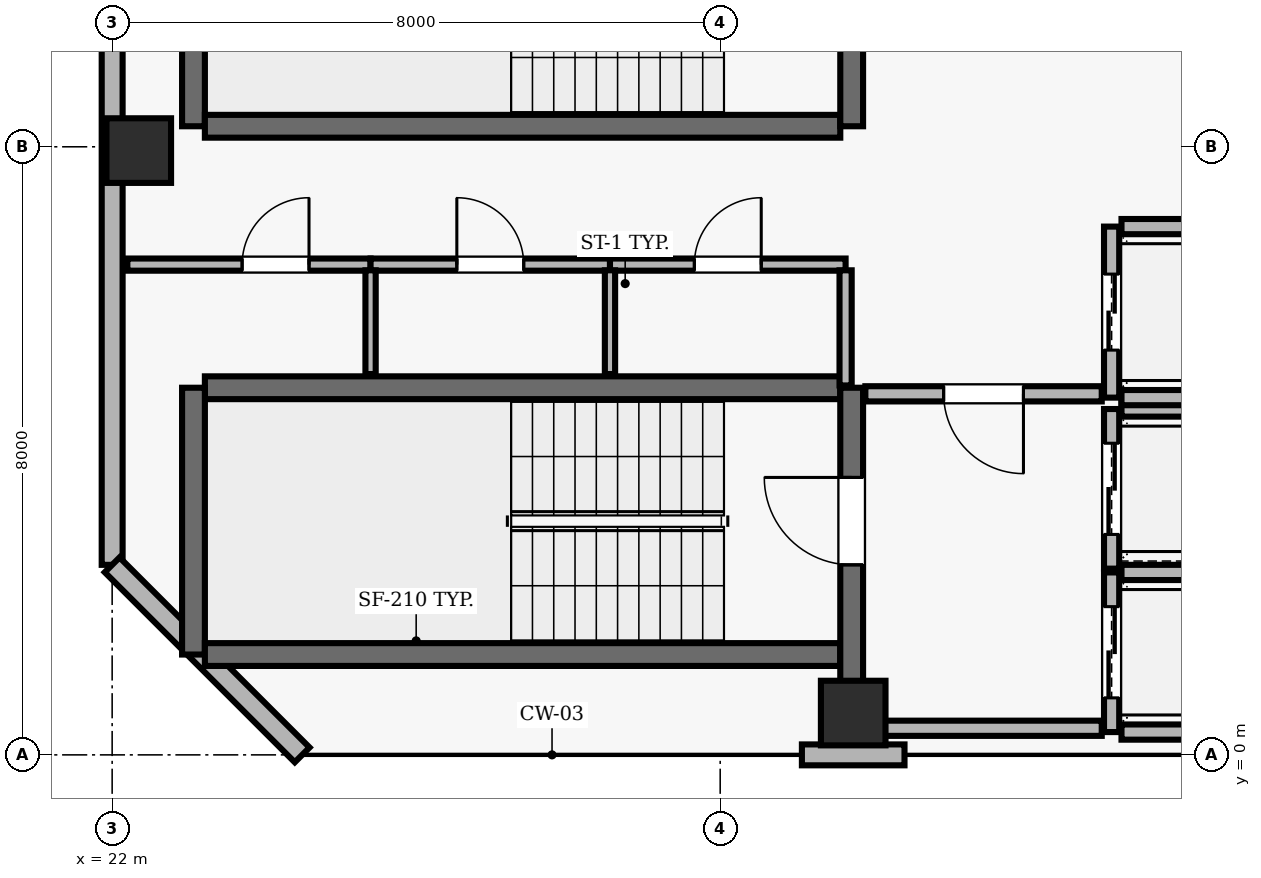
"""IFC4 building model, lengths in metres.
Left out: names, types, materials, properties, quantities, classifications, styles, units other than length and angle.
Written with IfcOpenShell. Run it as: python <this file> out.ifc"""

import sys

from ifc_helpers import new_model, si_unit, direction, frame, frame_2d, origin, origin_2d, place, context, subcontext, project, spatial, rectangle, extrude, element, fill, save


model = new_model("IFC4")
c1 = context("Model", 3, precision=1e-05, world=origin(), true_north=direction((0.0, 1.0)))
c2 = subcontext(c1, "Body", "Model", "MODEL_VIEW")
j1 = project(units=[si_unit("LENGTHUNIT", "METRE"), si_unit("PLANEANGLEUNIT", "RADIAN")], contexts=[c1])
p1 = place(None, origin())
s1 = spatial("IfcSite", under=j1, at=p1, CompositionType="ELEMENT")
p2 = place(p1, origin())
s2 = spatial("IfcBuilding", under=s1, at=p2, CompositionType="ELEMENT")
p3 = place(p2, frame((0.0, 0.0, 279.4)))
s3 = spatial("IfcBuildingStorey", under=s2, at=p3, CompositionType="ELEMENT", Elevation=279.4)
for number, where, z_axis, x_axis in (
    (1, (31.75, 0.55, 0.0), (0.0, 0.0, 1.0), (1.0, 0.0, 0.0)),
    (2, (22.35, 7.95, 0.0), (0.0, 0.0, 1.0), (1.0, 0.0, 0.0)),
):
    element("IfcColumn", number, at=place(p3, frame(where, z_axis=z_axis, x_axis=x_axis)), inside=s3, PredefinedType="COLUMN", context=c2, shape_type="SweptSolid", body=[
        extrude(rectangle(XDim=0.85, YDim=0.85, at=origin_2d()), origin(), (0.0, 0.0, 1.0), 3.9),
    ])
p4 = place(p3, frame((31.075, 0.0, 0.0), z_axis=(0.0, 0.0, 1.0), x_axis=(1.0, 0.0, 0.0)))
e3 = element("IfcWall", 3, at=p4, inside=s3, PredefinedType="SOLIDWALL", context=c2, shape_type="SweptSolid", body=[
    extrude(rectangle(XDim=1.35, YDim=0.275, at=frame_2d((0.675, 0.0))), origin(), (0.0, 0.0, 1.0), 3.69),
])
p5 = place(p3, frame((22.0, 35.3, 0.0), z_axis=(0.0, 0.0, 1.0), x_axis=(0.0, -1.0, 0.0)))
e4 = element("IfcWall", 4, at=p5, inside=s3, PredefinedType="SOLIDWALL", context=c2, shape_type="SweptSolid", body=[
    extrude(rectangle(XDim=32.8, YDim=0.275, at=frame_2d((16.4, 0.0))), origin(), (0.0, 0.0, 1.0), 3.69),
])
p6 = place(p5, frame((7.3, 0.0, 0.0)))
e5 = element("IfcOpeningElement", 5, at=p6, cuts=e4, PredefinedType="OPENING", context=c2, shape_type="SweptSolid", body=[
    extrude(rectangle(XDim=1.0, YDim=2.2, at=frame_2d((0.5, 1.1))), frame((0.0, 0.147, 0.0), z_axis=(0.0, -1.0, 0.0), x_axis=(1.0, 0.0, 0.0)), (0.0, 0.0, 1.0), 0.295),
])
p7 = place(p5, frame((12.717, 0.0, 0.9)))
e6 = element("IfcOpeningElement", 6, at=p7, cuts=e4, PredefinedType="OPENING", context=c2, shape_type="SweptSolid", body=[
    extrude(rectangle(XDim=2.8, YDim=1.8, at=frame_2d((1.4, 0.9))), frame((0.0, 0.147, 0.0), z_axis=(0.0, -1.0, 0.0), x_axis=(1.0, 0.0, 0.0)), (0.0, 0.0, 1.0), 0.295),
])
p8 = place(p5, frame((23.2, 0.0, 0.9)))
e7 = element("IfcOpeningElement", 7, at=p8, cuts=e4, PredefinedType="OPENING", context=c2, shape_type="SweptSolid", body=[
    extrude(rectangle(XDim=2.8, YDim=1.8, at=frame_2d((1.4, 0.9))), frame((0.0, 0.147, 0.0), z_axis=(0.0, -1.0, 0.0), x_axis=(1.0, 0.0, 0.0)), (0.0, 0.0, 1.0), 0.295),
])
p9 = place(p3, frame((22.0, 2.5, 0.0), z_axis=(0.0, 0.0, 1.0), x_axis=(0.707106781187, -0.707106781187, 0.0)))
e8 = element("IfcWall", 8, at=p9, inside=s3, PredefinedType="SOLIDWALL", context=c2, shape_type="SweptSolid", body=[
    extrude(rectangle(XDim=3.536, YDim=0.275, at=frame_2d((1.768, 0.0))), origin(), (0.0, 0.0, 1.0), 3.69),
])
p10 = place(p3, frame((31.58, 4.83, 0.0), z_axis=(0.0, 0.0, 1.0), x_axis=(-1.0, 0.0, 0.0)))
e9 = element("IfcWall", 9, at=p10, inside=s3, PredefinedType="SHEAR", context=c2, shape_type="SweptSolid", body=[
    extrude(rectangle(XDim=8.36, YDim=0.3, at=frame_2d((4.18, 0.0))), origin(), (0.0, 0.0, 1.0), 3.69),
])
p11 = place(p3, frame((23.07, 4.83, 0.0), z_axis=(0.0, 0.0, 1.0), x_axis=(0.0, -1.0, 0.0)))
e10 = element("IfcWall", 10, at=p11, inside=s3, PredefinedType="SHEAR", context=c2, shape_type="SweptSolid", body=[
    extrude(rectangle(XDim=3.51, YDim=0.3, at=frame_2d((1.755, 0.0))), origin(), (0.0, 0.0, 1.0), 3.69),
])
p12 = place(p3, frame((23.22, 1.32, 0.0), z_axis=(0.0, 0.0, 1.0), x_axis=(1.0, 0.0, 0.0)))
e11 = element("IfcWall", 11, at=p12, inside=s3, PredefinedType="SHEAR", context=c2, shape_type="SweptSolid", body=[
    extrude(rectangle(XDim=8.36, YDim=0.3, at=frame_2d((4.18, 0.0))), origin(), (0.0, 0.0, 1.0), 3.69),
])
p13 = place(p3, frame((31.73, 0.96, 0.0), z_axis=(0.0, 0.0, 1.0), x_axis=(0.0, 1.0, 0.0)))
e12 = element("IfcWall", 12, at=p13, inside=s3, PredefinedType="SHEAR", context=c2, shape_type="SweptSolid", body=[
    extrude(rectangle(XDim=3.87, YDim=0.3, at=frame_2d((1.935, 0.0))), origin(), (0.0, 0.0, 1.0), 3.69),
])
p14 = place(p13, frame((1.54, 0.0, 0.0)))
e13 = element("IfcOpeningElement", 13, at=p14, cuts=e12, PredefinedType="OPENING", context=c2, shape_type="SweptSolid", body=[
    extrude(rectangle(XDim=1.15, YDim=2.15, at=frame_2d((0.575, 1.075))), frame((0.0, 0.16, 0.0), z_axis=(0.0, -1.0, 0.0), x_axis=(1.0, 0.0, 0.0)), (0.0, 0.0, 1.0), 0.32),
])
p15 = place(p3, frame((23.07, 11.78, 0.0), z_axis=(0.0, 0.0, 1.0), x_axis=(0.0, -1.0, 0.0)))
e14 = element("IfcWall", 14, at=p15, inside=s3, PredefinedType="SHEAR", context=c2, shape_type="SweptSolid", body=[
    extrude(rectangle(XDim=3.51, YDim=0.3, at=frame_2d((1.755, 0.0))), origin(), (0.0, 0.0, 1.0), 3.69),
])
p16 = place(p3, frame((23.22, 8.27, 0.0), z_axis=(0.0, 0.0, 1.0), x_axis=(1.0, 0.0, 0.0)))
e15 = element("IfcWall", 15, at=p16, inside=s3, PredefinedType="SHEAR", context=c2, shape_type="SweptSolid", body=[
    extrude(rectangle(XDim=8.36, YDim=0.3, at=frame_2d((4.18, 0.0))), origin(), (0.0, 0.0, 1.0), 3.69),
])
p17 = place(p3, frame((31.73, 8.27, 0.0), z_axis=(0.0, 0.0, 1.0), x_axis=(0.0, 1.0, 0.0)))
e16 = element("IfcWall", 16, at=p17, inside=s3, PredefinedType="SHEAR", context=c2, shape_type="SweptSolid", body=[
    extrude(rectangle(XDim=3.51, YDim=0.3, at=frame_2d((1.755, 0.0))), origin(), (0.0, 0.0, 1.0), 3.69),
])
p18 = place(p17, frame((1.18, 0.0, 0.0)))
e17 = element("IfcOpeningElement", 17, at=p18, cuts=e16, PredefinedType="OPENING", context=c2, shape_type="SweptSolid", body=[
    extrude(rectangle(XDim=1.15, YDim=2.15, at=frame_2d((0.575, 1.075))), frame((0.0, 0.16, 0.0), z_axis=(0.0, -1.0, 0.0), x_axis=(1.0, 0.0, 0.0)), (0.0, 0.0, 1.0), 0.32),
])
p19 = place(p3, frame((35.15, 2.4, 0.0), z_axis=(0.0, 0.0, 1.0), x_axis=(0.0, -1.0, 0.0)))
e18 = element("IfcWall", 18, at=p19, inside=s3, PredefinedType="SOLIDWALL", context=c2, shape_type="SweptSolid", body=[
    extrude(rectangle(XDim=2.1, YDim=0.2, at=frame_2d((1.05, 0.0))), origin(), (0.0, 0.0, 1.0), 3.69),
])
p20 = place(p19, frame((0.45, 0.0, 0.0)))
e19 = element("IfcOpeningElement", 19, at=p20, cuts=e18, PredefinedType="OPENING", context=c2, shape_type="SweptSolid", body=[
    extrude(rectangle(XDim=1.2, YDim=2.15, at=frame_2d((0.6, 1.075))), frame((0.0, 0.11, 0.0), z_axis=(0.0, -1.0, 0.0), x_axis=(1.0, 0.0, 0.0)), (0.0, 0.0, 1.0), 0.22),
])
for number, where, z_axis, x_axis in (
    (20, (35.28, 0.3, 0.0), (0.0, 0.0, 1.0), (1.0, 0.0, 0.0)),
    (21, (37.42, 2.4, 0.0), (0.0, 0.0, 1.0), (-1.0, 0.0, 0.0)),
):
    element("IfcWall", number, at=place(p3, frame(where, z_axis=z_axis, x_axis=x_axis)), inside=s3, PredefinedType="SOLIDWALL", context=c2, shape_type="SweptSolid", body=[
        extrude(rectangle(XDim=2.14, YDim=0.2, at=frame_2d((1.07, 0.0))), origin(), (0.0, 0.0, 1.0), 3.69),
    ])
p21 = place(p3, frame((35.15, 4.55, 0.0), z_axis=(0.0, 0.0, 1.0), x_axis=(0.0, -1.0, 0.0)))
e22 = element("IfcWall", 22, at=p21, inside=s3, PredefinedType="SOLIDWALL", context=c2, shape_type="SweptSolid", body=[
    extrude(rectangle(XDim=2.1, YDim=0.2, at=frame_2d((1.05, 0.0))), origin(), (0.0, 0.0, 1.0), 3.69),
])
p22 = place(p21, frame((0.45, 0.0, 0.0)))
e23 = element("IfcOpeningElement", 23, at=p22, cuts=e22, PredefinedType="OPENING", context=c2, shape_type="SweptSolid", body=[
    extrude(rectangle(XDim=1.2, YDim=2.15, at=frame_2d((0.6, 1.075))), frame((0.0, 0.11, 0.0), z_axis=(0.0, -1.0, 0.0), x_axis=(1.0, 0.0, 0.0)), (0.0, 0.0, 1.0), 0.22),
])
p23 = place(p3, frame((37.42, 4.55, 0.0), z_axis=(0.0, 0.0, 1.0), x_axis=(-1.0, 0.0, 0.0)))
e24 = element("IfcWall", 24, at=p23, inside=s3, PredefinedType="SOLIDWALL", context=c2, shape_type="SweptSolid", body=[
    extrude(rectangle(XDim=2.14, YDim=0.2, at=frame_2d((1.07, 0.0))), origin(), (0.0, 0.0, 1.0), 3.69),
])
p24 = place(p3, frame((35.15, 6.95, 0.0), z_axis=(0.0, 0.0, 1.0), x_axis=(0.0, -1.0, 0.0)))
e25 = element("IfcWall", 25, at=p24, inside=s3, PredefinedType="SOLIDWALL", context=c2, shape_type="SweptSolid", body=[
    extrude(rectangle(XDim=2.25, YDim=0.2, at=frame_2d((1.125, 0.0))), origin(), (0.0, 0.0, 1.0), 3.69),
])
p25 = place(p24, frame((0.625, 0.0, 0.0)))
e26 = element("IfcOpeningElement", 26, at=p25, cuts=e25, PredefinedType="OPENING", context=c2, shape_type="SweptSolid", body=[
    extrude(rectangle(XDim=1.0, YDim=2.1, at=frame_2d((0.5, 1.05))), frame((0.0, 0.11, 0.0), z_axis=(0.0, -1.0, 0.0), x_axis=(1.0, 0.0, 0.0)), (0.0, 0.0, 1.0), 0.22),
])
for number, where, z_axis, x_axis in (
    (27, (35.28, 4.7, 0.0), (0.0, 0.0, 1.0), (1.0, 0.0, 0.0)),
    (28, (37.42, 6.95, 0.0), (0.0, 0.0, 1.0), (-1.0, 0.0, 0.0)),
):
    element("IfcWall", number, at=place(p3, frame(where, z_axis=z_axis, x_axis=x_axis)), inside=s3, PredefinedType="SOLIDWALL", context=c2, shape_type="SweptSolid", body=[
        extrude(rectangle(XDim=2.14, YDim=0.2, at=frame_2d((1.07, 0.0))), origin(), (0.0, 0.0, 1.0), 3.69),
    ])
p26 = place(p3, frame((22.2, 6.45, 0.0), z_axis=(0.0, 0.0, 1.0), x_axis=(1.0, 0.0, 0.0)))
e29 = element("IfcWall", 29, at=p26, inside=s3, PredefinedType="PARTITIONING", context=c2, shape_type="SweptSolid", body=[
    extrude(rectangle(XDim=3.2, YDim=0.16, at=frame_2d((1.6, 0.0))), origin(), (0.0, 0.0, 1.0), 3.69),
])
p27 = place(p26, frame((1.51, 0.0, 0.0)))
e30 = element("IfcOpeningElement", 30, at=p27, cuts=e29, PredefinedType="OPENING", context=c2, shape_type="SweptSolid", body=[
    extrude(rectangle(XDim=0.88, YDim=2.1, at=frame_2d((0.44, 1.05))), frame((0.0, 0.09, 0.0), z_axis=(0.0, -1.0, 0.0), x_axis=(1.0, 0.0, 0.0)), (0.0, 0.0, 1.0), 0.18),
])
p28 = place(p3, frame((25.4, 6.45, 0.0), z_axis=(0.0, 0.0, 1.0), x_axis=(1.0, 0.0, 0.0)))
e31 = element("IfcWall", 31, at=p28, inside=s3, PredefinedType="PARTITIONING", context=c2, shape_type="SweptSolid", body=[
    extrude(rectangle(XDim=3.15, YDim=0.16, at=frame_2d((1.575, 0.0))), origin(), (0.0, 0.0, 1.0), 3.69),
])
p29 = place(p28, frame((1.135, 0.0, 0.0)))
e32 = element("IfcOpeningElement", 32, at=p29, cuts=e31, PredefinedType="OPENING", context=c2, shape_type="SweptSolid", body=[
    extrude(rectangle(XDim=0.88, YDim=2.1, at=frame_2d((0.44, 1.05))), frame((0.0, 0.09, 0.0), z_axis=(0.0, -1.0, 0.0), x_axis=(1.0, 0.0, 0.0)), (0.0, 0.0, 1.0), 0.18),
])
p30 = place(p3, frame((28.55, 6.45, 0.0), z_axis=(0.0, 0.0, 1.0), x_axis=(1.0, 0.0, 0.0)))
e33 = element("IfcWall", 33, at=p30, inside=s3, PredefinedType="PARTITIONING", context=c2, shape_type="SweptSolid", body=[
    extrude(rectangle(XDim=3.1, YDim=0.16, at=frame_2d((1.55, 0.0))), origin(), (0.0, 0.0, 1.0), 3.69),
])
p31 = place(p30, frame((1.11, 0.0, 0.0)))
e34 = element("IfcOpeningElement", 34, at=p31, cuts=e33, PredefinedType="OPENING", context=c2, shape_type="SweptSolid", body=[
    extrude(rectangle(XDim=0.88, YDim=2.1, at=frame_2d((0.44, 1.05))), frame((0.0, 0.09, 0.0), z_axis=(0.0, -1.0, 0.0), x_axis=(1.0, 0.0, 0.0)), (0.0, 0.0, 1.0), 0.18),
])
p32 = place(p3, frame((31.65, 0.35, 0.0), z_axis=(0.0, 0.0, 1.0), x_axis=(1.0, 0.0, 0.0)))
e35 = element("IfcWall", 35, at=p32, inside=s3, PredefinedType="SOLIDWALL", context=c2, shape_type="SweptSolid", body=[
    extrude(rectangle(XDim=3.37, YDim=0.2, at=frame_2d((1.685, 0.0))), origin(), (0.0, 0.0, 1.0), 3.69),
])
p33 = place(p3, frame((35.02, 4.75, 0.0), z_axis=(0.0, 0.0, 1.0), x_axis=(-1.0, 0.0, 0.0)))
e36 = element("IfcWall", 36, at=p33, inside=s3, PredefinedType="SOLIDWALL", context=c2, shape_type="SweptSolid", body=[
    extrude(rectangle(XDim=3.11, YDim=0.2, at=frame_2d((1.555, 0.0))), origin(), (0.0, 0.0, 1.0), 3.69),
])
p34 = place(p33, frame((1.03, 0.0, 0.0)))
e37 = element("IfcOpeningElement", 37, at=p34, cuts=e36, PredefinedType="OPENING", context=c2, shape_type="SweptSolid", body=[
    extrude(rectangle(XDim=1.05, YDim=2.15, at=frame_2d((0.525, 1.075))), frame((0.0, 0.11, 0.0), z_axis=(0.0, -1.0, 0.0), x_axis=(1.0, 0.0, 0.0)), (0.0, 0.0, 1.0), 0.22),
])
for number, where, z_axis, x_axis in (
    (38, (25.4, 5.01, 0.0), (0.0, 0.0, 1.0), (0.0, 1.0, 0.0)),
    (39, (28.55, 5.01, 0.0), (0.0, 0.0, 1.0), (0.0, 1.0, 0.0)),
):
    element("IfcWall", number, at=place(p3, frame(where, z_axis=z_axis, x_axis=x_axis)), inside=s3, PredefinedType="PARTITIONING", context=c2, shape_type="SweptSolid", body=[
        extrude(rectangle(XDim=1.365, YDim=0.135, at=frame_2d((0.683, 0.0))), origin(), (0.0, 0.0, 1.0), 3.69),
    ])
p35 = place(p3, frame((31.65, 4.86, 0.0), z_axis=(0.0, 0.0, 1.0), x_axis=(0.0, 1.0, 0.0)))
e40 = element("IfcWall", 40, at=p35, inside=s3, PredefinedType="PARTITIONING", context=c2, shape_type="SweptSolid", body=[
    extrude(rectangle(XDim=1.515, YDim=0.16, at=frame_2d((0.757, 0.0))), origin(), (0.0, 0.0, 1.0), 3.69),
])
p36 = place(p14, origin())
e41 = element("IfcDoor", 41, at=p36, inside=s3, OperationType="SINGLE_SWING_RIGHT", PredefinedType="DOOR", context=c2, shape_type="SweptSolid", body=[
    extrude(rectangle(XDim=1.15, YDim=2.15, at=frame_2d((0.575, 1.075))), frame((0.0, 0.025, 0.0), z_axis=(0.0, -1.0, 0.0), x_axis=(1.0, 0.0, 0.0)), (0.0, 0.0, 1.0), 0.05),
])
fill(e13, e41)
p37 = place(p20, origin())
e42 = element("IfcDoor", 42, at=p37, inside=s3, OperationType="DOUBLE_DOOR_SLIDING", PredefinedType="DOOR", context=c2, shape_type="SweptSolid", body=[
    extrude(rectangle(XDim=1.2, YDim=2.15, at=frame_2d((0.6, 1.075))), frame((0.0, 0.025, 0.0), z_axis=(0.0, -1.0, 0.0), x_axis=(1.0, 0.0, 0.0)), (0.0, 0.0, 1.0), 0.05),
])
fill(e19, e42)
p38 = place(p22, origin())
e43 = element("IfcDoor", 43, at=p38, inside=s3, OperationType="DOUBLE_DOOR_SLIDING", PredefinedType="DOOR", context=c2, shape_type="SweptSolid", body=[
    extrude(rectangle(XDim=1.2, YDim=2.15, at=frame_2d((0.6, 1.075))), frame((0.0, 0.025, 0.0), z_axis=(0.0, -1.0, 0.0), x_axis=(1.0, 0.0, 0.0)), (0.0, 0.0, 1.0), 0.05),
])
fill(e23, e43)
p39 = place(p25, origin())
e44 = element("IfcDoor", 44, at=p39, inside=s3, OperationType="DOUBLE_DOOR_SLIDING", PredefinedType="DOOR", context=c2, shape_type="SweptSolid", body=[
    extrude(rectangle(XDim=1.0, YDim=2.1, at=frame_2d((0.5, 1.05))), frame((0.0, 0.025, 0.0), z_axis=(0.0, -1.0, 0.0), x_axis=(1.0, 0.0, 0.0)), (0.0, 0.0, 1.0), 0.05),
])
fill(e26, e44)
p40 = place(p34, origin())
e45 = element("IfcDoor", 45, at=p40, inside=s3, OperationType="SINGLE_SWING_LEFT", PredefinedType="DOOR", context=c2, shape_type="SweptSolid", body=[
    extrude(rectangle(XDim=1.05, YDim=2.15, at=frame_2d((0.525, 1.075))), frame((0.0, 0.025, 0.0), z_axis=(0.0, -1.0, 0.0), x_axis=(1.0, 0.0, 0.0)), (0.0, 0.0, 1.0), 0.05),
])
fill(e37, e45)
p41 = place(p27, origin())
e46 = element("IfcDoor", 46, at=p41, inside=s3, OperationType="SINGLE_SWING_RIGHT", PredefinedType="DOOR", context=c2, shape_type="SweptSolid", body=[
    extrude(rectangle(XDim=0.88, YDim=2.1, at=frame_2d((0.44, 1.05))), frame((0.0, 0.025, 0.0), z_axis=(0.0, -1.0, 0.0), x_axis=(1.0, 0.0, 0.0)), (0.0, 0.0, 1.0), 0.05),
])
fill(e30, e46)
p42 = place(p29, origin())
e47 = element("IfcDoor", 47, at=p42, inside=s3, OperationType="SINGLE_SWING_LEFT", PredefinedType="DOOR", context=c2, shape_type="SweptSolid", body=[
    extrude(rectangle(XDim=0.88, YDim=2.1, at=frame_2d((0.44, 1.05))), frame((0.0, 0.025, 0.0), z_axis=(0.0, -1.0, 0.0), x_axis=(1.0, 0.0, 0.0)), (0.0, 0.0, 1.0), 0.05),
])
fill(e32, e47)
p43 = place(p31, origin())
e48 = element("IfcDoor", 48, at=p43, inside=s3, OperationType="SINGLE_SWING_RIGHT", PredefinedType="DOOR", context=c2, shape_type="SweptSolid", body=[
    extrude(rectangle(XDim=0.88, YDim=2.1, at=frame_2d((0.44, 1.05))), frame((0.0, 0.025, 0.0), z_axis=(0.0, -1.0, 0.0), x_axis=(1.0, 0.0, 0.0)), (0.0, 0.0, 1.0), 0.05),
])
fill(e34, e48)
save(model, sys.argv[1])
